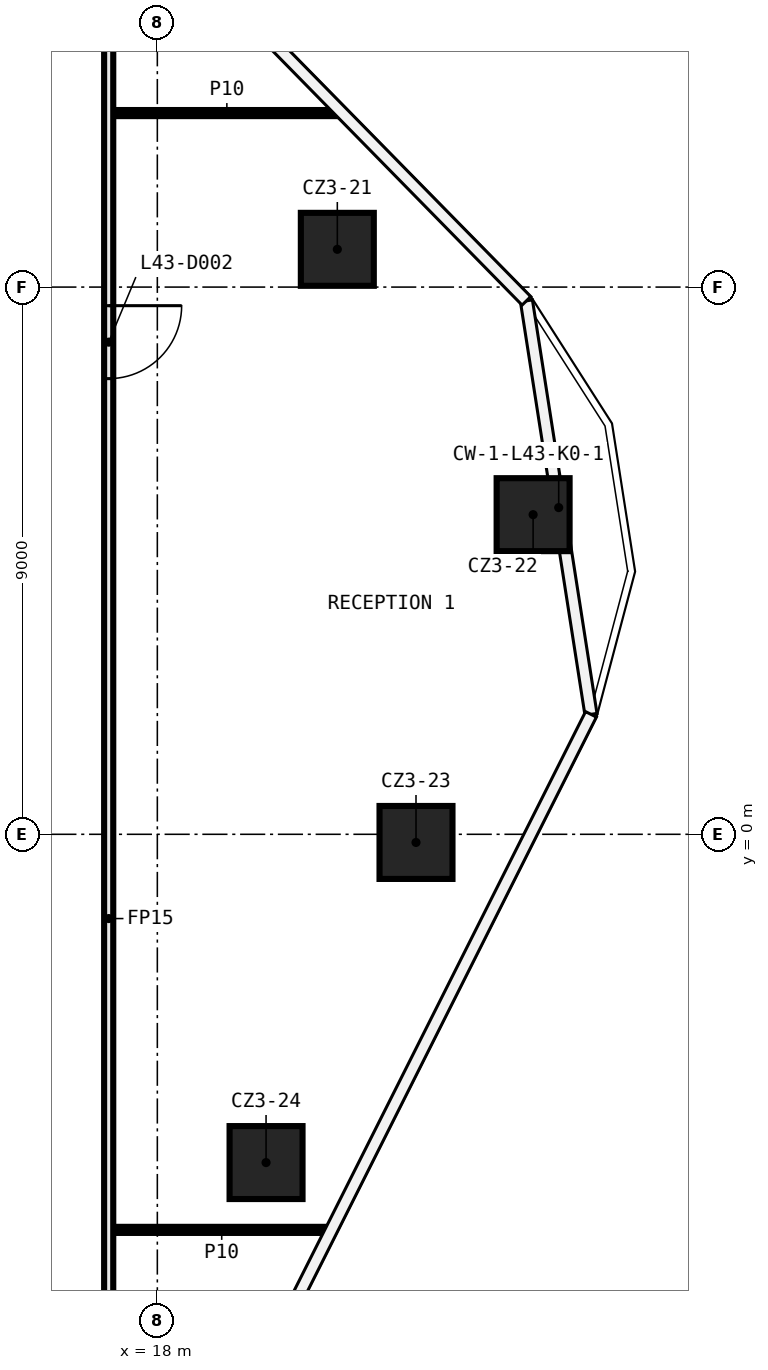
"""IFC4 building model, lengths in metres.
Left out: names, types, materials, properties, quantities, classifications, styles, units other than length and angle.
Written with IfcOpenShell. Run it as: python <this file> out.ifc"""

import sys

from ifc_helpers import new_model, si_unit, direction, frame, frame_2d, origin, origin_2d, place, context, subcontext, project, spatial, rectangle, extrude, element, fill, save


model = new_model("IFC4")
c1 = context("Model", 3, precision=1e-05, world=origin(), true_north=direction((0.0, 1.0)))
c2 = subcontext(c1, "Body", "Model", "MODEL_VIEW")
j1 = project(units=[si_unit("LENGTHUNIT", "METRE"), si_unit("PLANEANGLEUNIT", "RADIAN")], contexts=[c1])
p1 = place(None, origin())
s1 = spatial("IfcSite", under=j1, at=p1, CompositionType="ELEMENT")
p2 = place(p1, origin())
s2 = spatial("IfcBuilding", under=s1, at=p2, CompositionType="ELEMENT")
p3 = place(p2, frame((0.0, 0.0, 207.2)))
s3 = spatial("IfcBuildingStorey", under=s2, at=p3, CompositionType="ELEMENT", Elevation=207.2)
for number, where, z_axis, x_axis in (
    (1, (20.96, 9.621, 0.0), (0.0, 0.0, 1.0), (1.0, 0.0, 0.0)),
    (2, (24.18, 5.257, 0.0), (0.0, 0.0, 1.0), (1.0, 0.0, 0.0)),
    (3, (22.254, -0.134, 0.0), (0.0, 0.0, 1.0), (1.0, 0.0, 0.0)),
    (4, (19.788, -5.399, 0.0), (0.0, 0.0, 1.0), (1.0, 0.0, 0.0)),
):
    element("IfcColumn", number, at=place(p3, frame(where, z_axis=z_axis, x_axis=x_axis)), inside=s3, PredefinedType="COLUMN", context=c2, shape_type="SweptSolid", body=[
        extrude(rectangle(XDim=1.2, YDim=1.2, at=origin_2d()), origin(), (0.0, 0.0, 1.0), 3.82),
    ])
p4 = place(p3, frame((17.275, -6.506, 0.0), z_axis=(0.0, 0.0, 1.0), x_axis=(1.0, 0.0, 0.0)))
e5 = element("IfcWall", 5, at=p4, inside=s3, PredefinedType="PARTITIONING", context=c2, shape_type="SweptSolid", body=[
    extrude(rectangle(XDim=3.568, YDim=0.1, at=frame_2d((1.784, 0.0))), origin(), (0.0, 0.0, 1.0), 3.82),
])
p5 = place(p3, frame((17.275, 11.862, 0.0), z_axis=(0.0, 0.0, 1.0), x_axis=(1.0, 0.0, 0.0)))
e6 = element("IfcWall", 6, at=p5, inside=s3, PredefinedType="PARTITIONING", context=c2, shape_type="SweptSolid", body=[
    extrude(rectangle(XDim=3.737, YDim=0.1, at=frame_2d((1.868, 0.0))), origin(), (0.0, 0.0, 1.0), 3.82),
])
p6 = place(p3, frame((17.2, 13.106, 0.0), z_axis=(0.0, 0.0, 1.0), x_axis=(0.0, -1.0, 0.0)))
e7 = element("IfcWall", 7, at=p6, inside=s3, PredefinedType="PARTITIONING", context=c2, shape_type="SweptSolid", body=[
    extrude(rectangle(XDim=23.172, YDim=0.15, at=frame_2d((11.586, 0.0))), origin(), (0.0, 0.0, 1.0), 3.82),
])
p7 = place(p6, frame((4.412, 0.0, 0.0)))
e8 = element("IfcOpeningElement", 8, at=p7, cuts=e7, PredefinedType="OPENING", context=c2, shape_type="SweptSolid", body=[
    extrude(rectangle(XDim=1.2, YDim=2.1, at=frame_2d((0.6, 1.05))), frame((0.0, 0.085, 0.0), z_axis=(0.0, -1.0, 0.0), x_axis=(1.0, 0.0, 0.0)), (0.0, 0.0, 1.0), 0.17),
])
p8 = place(p7, origin())
e9 = element("IfcDoor", 9, at=p8, inside=s3, OperationType="SINGLE_SWING_LEFT", PredefinedType="DOOR", context=c2, shape_type="SweptSolid", body=[
    extrude(rectangle(XDim=1.2, YDim=2.1, at=frame_2d((0.6, 1.05))), frame((0.0, 0.025, 0.0), z_axis=(0.0, -1.0, 0.0), x_axis=(1.0, 0.0, 0.0)), (0.0, 0.0, 1.0), 0.05),
])
fill(e8, e9)
save(model, sys.argv[1])
